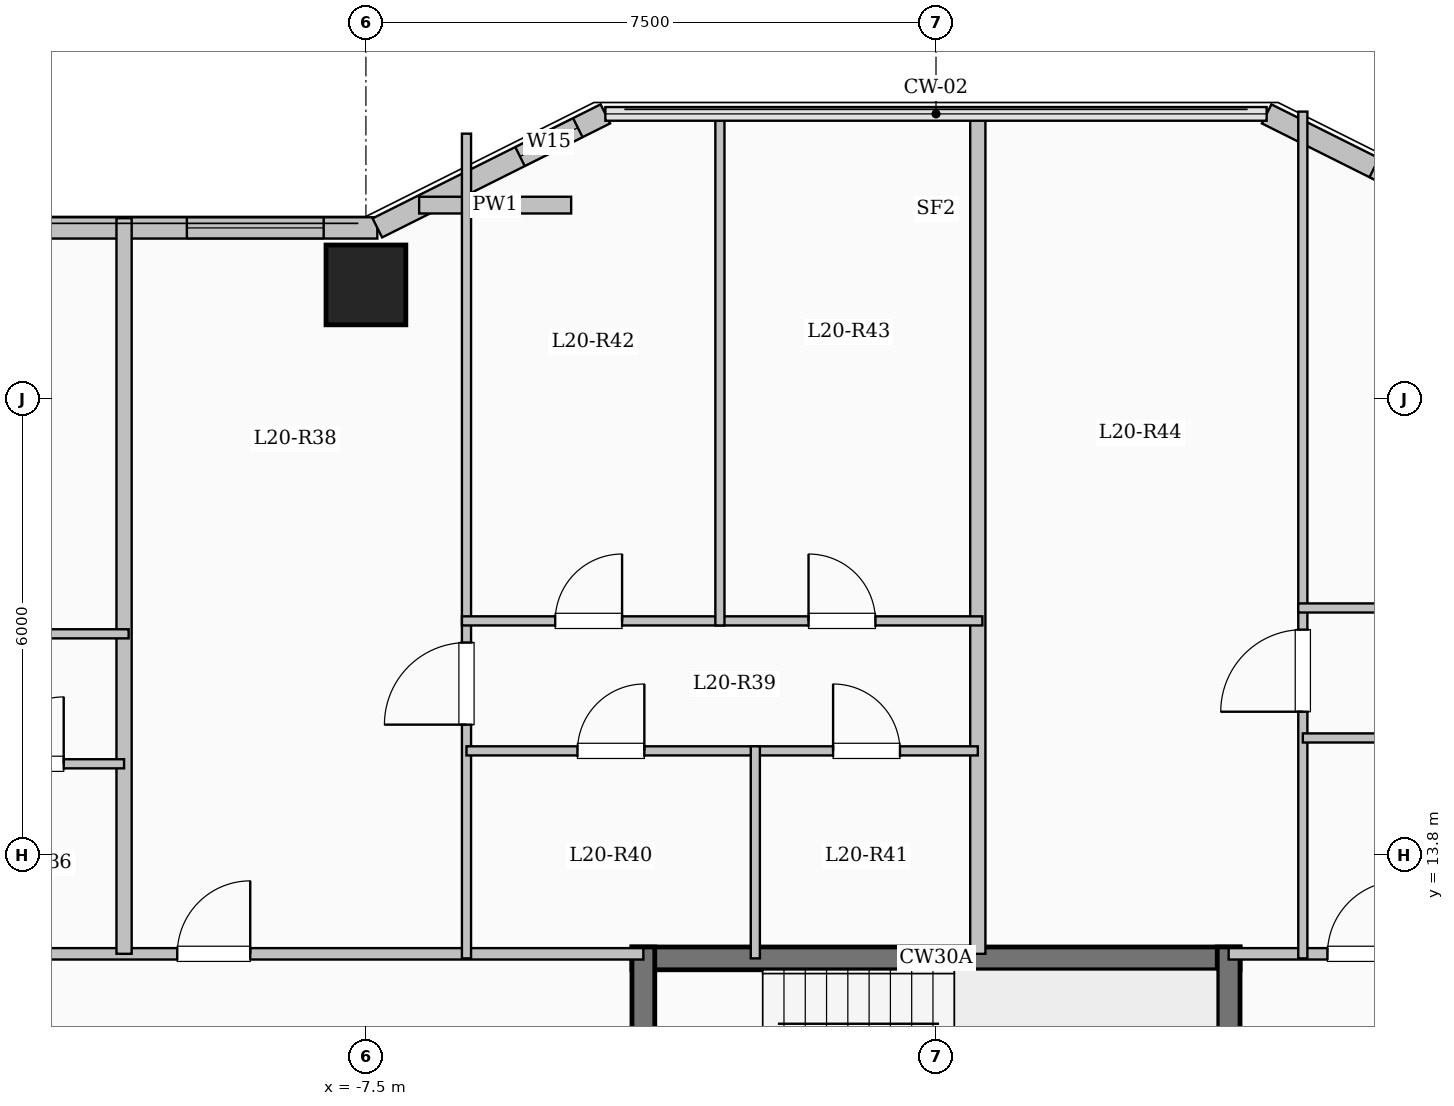
"""IFC4 building model, lengths in metres.
Left out: names, types, materials, properties, quantities, classifications, styles, units other than length and angle.
Written with IfcOpenShell. Run it as: python <this file> out.ifc"""

import sys

from ifc_helpers import new_model, si_unit, direction, frame, frame_2d, origin, origin_2d, place, context, subcontext, project, spatial, rectangle, extrude, element, fill, save


model = new_model("IFC4")
c1 = context("Model", 3, precision=1e-05, world=origin(), true_north=direction((0.0, 1.0)))
c2 = subcontext(c1, "Body", "Model", "MODEL_VIEW")
j1 = project(units=[si_unit("LENGTHUNIT", "METRE"), si_unit("PLANEANGLEUNIT", "RADIAN")], contexts=[c1])
p1 = place(None, origin())
s1 = spatial("IfcSite", under=j1, at=p1, CompositionType="ELEMENT")
p2 = place(p1, origin())
s2 = spatial("IfcBuilding", under=s1, at=p2, CompositionType="ELEMENT")
p3 = place(p2, frame((0.0, 0.0, 78.3)))
s3 = spatial("IfcBuildingStorey", under=s2, at=p3, CompositionType="ELEMENT", Elevation=78.3)
p4 = place(p3, frame((-7.5, 21.3, 0.0), z_axis=(0.0, 0.0, 1.0), x_axis=(1.0, 0.0, 0.0)))
e1 = element("IfcColumn", 1, at=p4, inside=s3, PredefinedType="COLUMN", context=c2, shape_type="SweptSolid", body=[
    extrude(rectangle(XDim=1.05, YDim=1.05, at=origin_2d()), origin(), (0.0, 0.0, 1.0), 3.35),
])
p5 = place(p3, frame((-21.15, 22.05, 0.0), z_axis=(0.0, 0.0, 1.0), x_axis=(1.0, 0.0, 0.0)))
e2 = element("IfcWall", 2, at=p5, inside=s3, PredefinedType="SOLIDWALL", context=c2, shape_type="SweptSolid", body=[
    extrude(rectangle(XDim=13.8, YDim=0.28, at=frame_2d((6.9, 0.0))), origin(), (0.0, 0.0, 1.0), 3.1),
])
p6 = place(p5, frame((1.485, 0.0, 0.9)))
e3 = element("IfcOpeningElement", 3, at=p6, cuts=e2, PredefinedType="OPENING", context=c2, shape_type="SweptSolid", body=[
    extrude(rectangle(XDim=2.4, YDim=1.8, at=frame_2d((1.2, 0.9))), frame((0.0, 0.15, 0.0), z_axis=(0.0, -1.0, 0.0), x_axis=(1.0, 0.0, 0.0)), (0.0, 0.0, 1.0), 0.3),
])
p7 = place(p5, frame((6.979, 0.0, 0.9)))
e4 = element("IfcOpeningElement", 4, at=p7, cuts=e2, PredefinedType="OPENING", context=c2, shape_type="SweptSolid", body=[
    extrude(rectangle(XDim=1.8, YDim=1.65, at=frame_2d((0.9, 0.825))), frame((0.0, 0.15, 0.0), z_axis=(0.0, -1.0, 0.0), x_axis=(1.0, 0.0, 0.0)), (0.0, 0.0, 1.0), 0.3),
])
p8 = place(p5, frame((11.294, 0.0, 0.9)))
e5 = element("IfcOpeningElement", 5, at=p8, cuts=e2, PredefinedType="OPENING", context=c2, shape_type="SweptSolid", body=[
    extrude(rectangle(XDim=1.8, YDim=1.65, at=frame_2d((0.9, 0.825))), frame((0.0, 0.15, 0.0), z_axis=(0.0, -1.0, 0.0), x_axis=(1.0, 0.0, 0.0)), (0.0, 0.0, 1.0), 0.3),
])
p9 = place(p3, frame((-7.35, 22.05, 0.0), z_axis=(0.0, 0.0, 1.0), x_axis=(0.894427191, 0.4472135955, 0.0)))
e6 = element("IfcWall", 6, at=p9, inside=s3, PredefinedType="SOLIDWALL", context=c2, shape_type="SweptSolid", body=[
    extrude(rectangle(XDim=3.354, YDim=0.28, at=frame_2d((1.677, 0.0))), origin(), (0.0, 0.0, 1.0), 3.1),
])
p10 = place(p9, frame((2.099, 0.0, 0.95)))
e7 = element("IfcOpeningElement", 7, at=p10, cuts=e6, PredefinedType="OPENING", context=c2, shape_type="SweptSolid", body=[
    extrude(rectangle(XDim=0.85, YDim=1.5, at=frame_2d((0.425, 0.75))), frame((0.0, 0.15, 0.0), z_axis=(0.0, -1.0, 0.0), x_axis=(1.0, 0.0, 0.0)), (0.0, 0.0, 1.0), 0.3),
])
p11 = place(p3, frame((4.35, 23.55, 0.0), z_axis=(0.0, 0.0, 1.0), x_axis=(0.894427191, -0.4472135955, 0.0)))
e8 = element("IfcWall", 8, at=p11, inside=s3, PredefinedType="SOLIDWALL", context=c2, shape_type="SweptSolid", body=[
    extrude(rectangle(XDim=3.354, YDim=0.28, at=frame_2d((1.677, 0.0))), origin(), (0.0, 0.0, 1.0), 3.1),
])
p12 = place(p11, frame((1.583, 0.0, 0.95)))
e9 = element("IfcOpeningElement", 9, at=p12, cuts=e8, PredefinedType="OPENING", context=c2, shape_type="SweptSolid", body=[
    extrude(rectangle(XDim=1.2, YDim=1.5, at=frame_2d((0.6, 0.75))), frame((0.0, 0.15, 0.0), z_axis=(0.0, -1.0, 0.0), x_axis=(1.0, 0.0, 0.0)), (0.0, 0.0, 1.0), 0.3),
])
p13 = place(p3, frame((-6.8, 22.35, 0.0), z_axis=(0.0, 0.0, 1.0), x_axis=(1.0, 0.0, 0.0)))
e10 = element("IfcWall", 10, at=p13, inside=s3, PredefinedType="PARAPET", context=c2, shape_type="SweptSolid", body=[
    extrude(rectangle(XDim=2.0, YDim=0.22, at=frame_2d((1.0, 0.0))), origin(), (0.0, 0.0, 1.0), 0.85),
])
p14 = place(p3, frame((-4.0, 12.44, 0.0), z_axis=(0.0, 0.0, 1.0), x_axis=(1.0, 0.0, 0.0)))
e11 = element("IfcWall", 11, at=p14, inside=s3, PredefinedType="SHEAR", context=c2, shape_type="SweptSolid", body=[
    extrude(rectangle(XDim=8.0, YDim=0.3, at=frame_2d((4.0, 0.0))), origin(), (0.0, 0.0, 1.0), 3.35),
])
for number, where, z_axis, x_axis in (
    (12, (-3.85, 9.0, 0.0), (0.0, 0.0, 1.0), (0.0, 1.0, 0.0)),
    (13, (3.85, 9.0, 0.0), (0.0, 0.0, 1.0), (0.0, 1.0, 0.0)),
):
    element("IfcWall", number, at=place(p3, frame(where, z_axis=z_axis, x_axis=x_axis)), inside=s3, PredefinedType="SHEAR", context=c2, shape_type="SweptSolid", body=[
        extrude(rectangle(XDim=3.59, YDim=0.3, at=frame_2d((1.795, 0.0))), origin(), (0.0, 0.0, 1.0), 3.35),
    ])
p15 = place(p3, frame((-21.05, 12.5, 0.0), z_axis=(0.0, 0.0, 1.0), x_axis=(1.0, 0.0, 0.0)))
e14 = element("IfcWall", 14, at=p15, inside=s3, PredefinedType="PARTITIONING", context=c2, shape_type="SweptSolid", body=[
    extrude(rectangle(XDim=17.2, YDim=0.15, at=frame_2d((8.6, 0.0))), origin(), (0.0, 0.0, 1.0), 3.1),
])
p16 = place(p15, frame((0.7, 0.0, 0.0)))
e15 = element("IfcOpeningElement", 15, at=p16, cuts=e14, PredefinedType="OPENING", context=c2, shape_type="SweptSolid", body=[
    extrude(rectangle(XDim=0.96, YDim=2.15, at=frame_2d((0.48, 1.075))), frame((0.0, 0.085, 0.0), z_axis=(0.0, -1.0, 0.0), x_axis=(1.0, 0.0, 0.0)), (0.0, 0.0, 1.0), 0.17),
])
p17 = place(p15, frame((11.068, 0.0, 0.0)))
e16 = element("IfcOpeningElement", 16, at=p17, cuts=e14, PredefinedType="OPENING", context=c2, shape_type="SweptSolid", body=[
    extrude(rectangle(XDim=0.96, YDim=2.15, at=frame_2d((0.48, 1.075))), frame((0.0, 0.085, 0.0), z_axis=(0.0, -1.0, 0.0), x_axis=(1.0, 0.0, 0.0)), (0.0, 0.0, 1.0), 0.17),
])
p18 = place(p3, frame((3.85, 12.5, 0.0), z_axis=(0.0, 0.0, 1.0), x_axis=(1.0, 0.0, 0.0)))
e17 = element("IfcWall", 17, at=p18, inside=s3, PredefinedType="PARTITIONING", context=c2, shape_type="SweptSolid", body=[
    extrude(rectangle(XDim=17.2, YDim=0.15, at=frame_2d((8.6, 0.0))), origin(), (0.0, 0.0, 1.0), 3.1),
])
p19 = place(p18, frame((1.3, 0.0, 0.0)))
e18 = element("IfcOpeningElement", 18, at=p19, cuts=e17, PredefinedType="OPENING", context=c2, shape_type="SweptSolid", body=[
    extrude(rectangle(XDim=0.96, YDim=2.15, at=frame_2d((0.48, 1.075))), frame((0.0, 0.085, 0.0), z_axis=(0.0, -1.0, 0.0), x_axis=(1.0, 0.0, 0.0)), (0.0, 0.0, 1.0), 0.17),
])
p20 = place(p18, frame((8.06, 0.0, 0.0)))
e19 = element("IfcOpeningElement", 19, at=p20, cuts=e17, PredefinedType="OPENING", context=c2, shape_type="SweptSolid", body=[
    extrude(rectangle(XDim=0.96, YDim=2.15, at=frame_2d((0.48, 1.075))), frame((0.0, 0.085, 0.0), z_axis=(0.0, -1.0, 0.0), x_axis=(1.0, 0.0, 0.0)), (0.0, 0.0, 1.0), 0.17),
])
p21 = place(p3, frame((0.55, 12.5, 0.0), z_axis=(0.0, 0.0, 1.0), x_axis=(0.0, 1.0, 0.0)))
e20 = element("IfcWall", 20, at=p21, inside=s3, PredefinedType="SOLIDWALL", context=c2, shape_type="SweptSolid", body=[
    extrude(rectangle(XDim=11.08, YDim=0.2, at=frame_2d((5.54, 0.0))), origin(), (0.0, 0.0, 1.0), 3.1),
])
p22 = place(p3, frame((-10.682, 12.5, 0.0), z_axis=(0.0, 0.0, 1.0), x_axis=(0.0, 1.0, 0.0)))
e21 = element("IfcWall", 21, at=p22, inside=s3, PredefinedType="SOLIDWALL", context=c2, shape_type="SweptSolid", body=[
    extrude(rectangle(XDim=9.678, YDim=0.2, at=frame_2d((4.839, 0.0))), origin(), (0.0, 0.0, 1.0), 3.1),
])
p23 = place(p3, frame((-13.15, 15.0, 0.0), z_axis=(0.0, 0.0, 1.0), x_axis=(1.0, 0.0, 0.0)))
e22 = element("IfcWall", 22, at=p23, inside=s3, PredefinedType="PARTITIONING", context=c2, shape_type="SweptSolid", body=[
    extrude(rectangle(XDim=2.468, YDim=0.12, at=frame_2d((1.234, 0.0))), origin(), (0.0, 0.0, 1.0), 3.1),
])
p24 = place(p23, frame((0.794, 0.0, 0.0)))
e23 = element("IfcOpeningElement", 23, at=p24, cuts=e22, PredefinedType="OPENING", context=c2, shape_type="SweptSolid", body=[
    extrude(rectangle(XDim=0.88, YDim=2.1, at=frame_2d((0.44, 1.05))), frame((0.0, 0.07, 0.0), z_axis=(0.0, -1.0, 0.0), x_axis=(1.0, 0.0, 0.0)), (0.0, 0.0, 1.0), 0.14),
])
p25 = place(p3, frame((-15.926, 16.71, 0.0), z_axis=(0.0, 0.0, 1.0), x_axis=(1.0, 0.0, 0.0)))
e24 = element("IfcWall", 24, at=p25, inside=s3, PredefinedType="PARTITIONING", context=c2, shape_type="SweptSolid", body=[
    extrude(rectangle(XDim=5.304, YDim=0.12, at=frame_2d((2.652, 0.0))), origin(), (0.0, 0.0, 1.0), 3.1),
])
p26 = place(p25, frame((2.122, 0.0, 0.0)))
e25 = element("IfcOpeningElement", 25, at=p26, cuts=e24, PredefinedType="OPENING", context=c2, shape_type="SweptSolid", body=[
    extrude(rectangle(XDim=0.88, YDim=2.1, at=frame_2d((0.44, 1.05))), frame((0.0, 0.07, 0.0), z_axis=(0.0, -1.0, 0.0), x_axis=(1.0, 0.0, 0.0)), (0.0, 0.0, 1.0), 0.14),
])
p27 = place(p3, frame((-6.177, 12.44, 0.0), z_axis=(0.0, 0.0, 1.0), x_axis=(0.0, 1.0, 0.0)))
e26 = element("IfcWall", 26, at=p27, inside=s3, PredefinedType="PARTITIONING", context=c2, shape_type="SweptSolid", body=[
    extrude(rectangle(XDim=10.85, YDim=0.12, at=frame_2d((5.425, 0.0))), origin(), (0.0, 0.0, 1.0), 3.1),
])
p28 = place(p27, frame((3.075, 0.0, 0.0)))
e27 = element("IfcOpeningElement", 27, at=p28, cuts=e26, PredefinedType="OPENING", context=c2, shape_type="SweptSolid", body=[
    extrude(rectangle(XDim=1.08, YDim=2.15, at=frame_2d((0.54, 1.075))), frame((0.0, 0.07, 0.0), z_axis=(0.0, -1.0, 0.0), x_axis=(1.0, 0.0, 0.0)), (0.0, 0.0, 1.0), 0.14),
])
p29 = place(p3, frame((-6.177, 15.17, 0.0), z_axis=(0.0, 0.0, 1.0), x_axis=(1.0, 0.0, 0.0)))
e28 = element("IfcWall", 28, at=p29, inside=s3, PredefinedType="PARTITIONING", context=c2, shape_type="SweptSolid", body=[
    extrude(rectangle(XDim=3.8, YDim=0.12, at=frame_2d((1.9, 0.0))), origin(), (0.0, 0.0, 1.0), 3.1),
])
p30 = place(p29, frame((1.46, 0.0, 0.0)))
e29 = element("IfcOpeningElement", 29, at=p30, cuts=e28, PredefinedType="OPENING", context=c2, shape_type="SweptSolid", body=[
    extrude(rectangle(XDim=0.88, YDim=2.1, at=frame_2d((0.44, 1.05))), frame((0.0, 0.07, 0.0), z_axis=(0.0, -1.0, 0.0), x_axis=(1.0, 0.0, 0.0)), (0.0, 0.0, 1.0), 0.14),
])
p31 = place(p3, frame((-2.377, 15.17, 0.0), z_axis=(0.0, 0.0, 1.0), x_axis=(1.0, 0.0, 0.0)))
e30 = element("IfcWall", 30, at=p31, inside=s3, PredefinedType="PARTITIONING", context=c2, shape_type="SweptSolid", body=[
    extrude(rectangle(XDim=2.927, YDim=0.12, at=frame_2d((1.463, 0.0))), origin(), (0.0, 0.0, 1.0), 3.1),
])
p32 = place(p31, frame((1.023, 0.0, 0.0)))
e31 = element("IfcOpeningElement", 31, at=p32, cuts=e30, PredefinedType="OPENING", context=c2, shape_type="SweptSolid", body=[
    extrude(rectangle(XDim=0.88, YDim=2.1, at=frame_2d((0.44, 1.05))), frame((0.0, 0.07, 0.0), z_axis=(0.0, -1.0, 0.0), x_axis=(1.0, 0.0, 0.0)), (0.0, 0.0, 1.0), 0.14),
])
p33 = place(p3, frame((-6.237, 16.88, 0.0), z_axis=(0.0, 0.0, 1.0), x_axis=(1.0, 0.0, 0.0)))
e32 = element("IfcWall", 32, at=p33, inside=s3, PredefinedType="PARTITIONING", context=c2, shape_type="SweptSolid", body=[
    extrude(rectangle(XDim=6.847, YDim=0.12, at=frame_2d((3.424, 0.0))), origin(), (0.0, 0.0, 1.0), 3.1),
])
p34 = place(p33, frame((1.227, 0.0, 0.0)))
e33 = element("IfcOpeningElement", 33, at=p34, cuts=e32, PredefinedType="OPENING", context=c2, shape_type="SweptSolid", body=[
    extrude(rectangle(XDim=0.88, YDim=2.1, at=frame_2d((0.44, 1.05))), frame((0.0, 0.07, 0.0), z_axis=(0.0, -1.0, 0.0), x_axis=(1.0, 0.0, 0.0)), (0.0, 0.0, 1.0), 0.14),
])
p35 = place(p33, frame((4.56, 0.0, 0.0)))
e34 = element("IfcOpeningElement", 34, at=p35, cuts=e32, PredefinedType="OPENING", context=c2, shape_type="SweptSolid", body=[
    extrude(rectangle(XDim=0.88, YDim=2.1, at=frame_2d((0.44, 1.05))), frame((0.0, 0.07, 0.0), z_axis=(0.0, -1.0, 0.0), x_axis=(1.0, 0.0, 0.0)), (0.0, 0.0, 1.0), 0.14),
])
p36 = place(p3, frame((-2.377, 12.44, 0.0), z_axis=(0.0, 0.0, 1.0), x_axis=(0.0, 1.0, 0.0)))
e35 = element("IfcWall", 35, at=p36, inside=s3, PredefinedType="PARTITIONING", context=c2, shape_type="SweptSolid", body=[
    extrude(rectangle(XDim=2.79, YDim=0.12, at=frame_2d((1.395, 0.0))), origin(), (0.0, 0.0, 1.0), 3.1),
])
p37 = place(p3, frame((-2.843, 16.82, 0.0), z_axis=(0.0, 0.0, 1.0), x_axis=(0.0, 1.0, 0.0)))
e36 = element("IfcWall", 36, at=p37, inside=s3, PredefinedType="PARTITIONING", context=c2, shape_type="SweptSolid", body=[
    extrude(rectangle(XDim=6.76, YDim=0.12, at=frame_2d((3.38, 0.0))), origin(), (0.0, 0.0, 1.0), 3.1),
])
p38 = place(p3, frame((4.826, 12.44, 0.0), z_axis=(0.0, 0.0, 1.0), x_axis=(0.0, 1.0, 0.0)))
e37 = element("IfcWall", 37, at=p38, inside=s3, PredefinedType="PARTITIONING", context=c2, shape_type="SweptSolid", body=[
    extrude(rectangle(XDim=11.14, YDim=0.12, at=frame_2d((5.57, 0.0))), origin(), (0.0, 0.0, 1.0), 3.1),
])
p39 = place(p38, frame((3.245, 0.0, 0.0)))
e38 = element("IfcOpeningElement", 38, at=p39, cuts=e37, PredefinedType="OPENING", context=c2, shape_type="SweptSolid", body=[
    extrude(rectangle(XDim=1.08, YDim=2.15, at=frame_2d((0.54, 1.075))), frame((0.0, 0.07, 0.0), z_axis=(0.0, -1.0, 0.0), x_axis=(1.0, 0.0, 0.0)), (0.0, 0.0, 1.0), 0.14),
])
p40 = place(p3, frame((4.826, 15.34, 0.0), z_axis=(0.0, 0.0, 1.0), x_axis=(1.0, 0.0, 0.0)))
e39 = element("IfcWall", 39, at=p40, inside=s3, PredefinedType="PARTITIONING", context=c2, shape_type="SweptSolid", body=[
    extrude(rectangle(XDim=3.099, YDim=0.12, at=frame_2d((1.55, 0.0))), origin(), (0.0, 0.0, 1.0), 3.1),
])
p41 = place(p40, frame((1.11, 0.0, 0.0)))
e40 = element("IfcOpeningElement", 40, at=p41, cuts=e39, PredefinedType="OPENING", context=c2, shape_type="SweptSolid", body=[
    extrude(rectangle(XDim=0.88, YDim=2.1, at=frame_2d((0.44, 1.05))), frame((0.0, 0.07, 0.0), z_axis=(0.0, -1.0, 0.0), x_axis=(1.0, 0.0, 0.0)), (0.0, 0.0, 1.0), 0.14),
])
p42 = place(p3, frame((4.766, 17.05, 0.0), z_axis=(0.0, 0.0, 1.0), x_axis=(1.0, 0.0, 0.0)))
e41 = element("IfcWall", 41, at=p42, inside=s3, PredefinedType="PARTITIONING", context=c2, shape_type="SweptSolid", body=[
    extrude(rectangle(XDim=6.504, YDim=0.12, at=frame_2d((3.252, 0.0))), origin(), (0.0, 0.0, 1.0), 3.1),
])
p43 = place(p42, frame((1.141, 0.0, 0.0)))
e42 = element("IfcOpeningElement", 42, at=p43, cuts=e41, PredefinedType="OPENING", context=c2, shape_type="SweptSolid", body=[
    extrude(rectangle(XDim=0.88, YDim=2.1, at=frame_2d((0.44, 1.05))), frame((0.0, 0.07, 0.0), z_axis=(0.0, -1.0, 0.0), x_axis=(1.0, 0.0, 0.0)), (0.0, 0.0, 1.0), 0.14),
])
p44 = place(p42, frame((4.303, 0.0, 0.0)))
e43 = element("IfcOpeningElement", 43, at=p44, cuts=e41, PredefinedType="OPENING", context=c2, shape_type="SweptSolid", body=[
    extrude(rectangle(XDim=0.88, YDim=2.1, at=frame_2d((0.44, 1.05))), frame((0.0, 0.07, 0.0), z_axis=(0.0, -1.0, 0.0), x_axis=(1.0, 0.0, 0.0)), (0.0, 0.0, 1.0), 0.14),
])
p45 = place(p8, origin())
e44 = element("IfcWindow", 44, at=p45, inside=s3, PartitioningType="SINGLE_PANEL", PredefinedType="WINDOW", context=c2, shape_type="SweptSolid", body=[
    extrude(rectangle(XDim=1.8, YDim=1.65, at=frame_2d((0.9, 0.825))), frame((0.0, 0.03, 0.0), z_axis=(0.0, -1.0, 0.0), x_axis=(1.0, 0.0, 0.0)), (0.0, 0.0, 1.0), 0.06),
])
fill(e5, e44)
p46 = place(p10, origin())
e45 = element("IfcWindow", 45, at=p46, inside=s3, PartitioningType="SINGLE_PANEL", PredefinedType="WINDOW", context=c2, shape_type="SweptSolid", body=[
    extrude(rectangle(XDim=0.85, YDim=1.5, at=frame_2d((0.425, 0.75))), frame((0.0, 0.03, 0.0), z_axis=(0.0, -1.0, 0.0), x_axis=(1.0, 0.0, 0.0)), (0.0, 0.0, 1.0), 0.06),
])
fill(e7, e45)
p47 = place(p12, origin())
e46 = element("IfcWindow", 46, at=p47, inside=s3, PartitioningType="SINGLE_PANEL", PredefinedType="WINDOW", context=c2, shape_type="SweptSolid", body=[
    extrude(rectangle(XDim=1.2, YDim=1.5, at=frame_2d((0.6, 0.75))), frame((0.0, 0.03, 0.0), z_axis=(0.0, -1.0, 0.0), x_axis=(1.0, 0.0, 0.0)), (0.0, 0.0, 1.0), 0.06),
])
fill(e9, e46)
p48 = place(p24, origin())
e47 = element("IfcDoor", 47, at=p48, inside=s3, OperationType="SINGLE_SWING_RIGHT", PredefinedType="DOOR", context=c2, shape_type="SweptSolid", body=[
    extrude(rectangle(XDim=0.88, YDim=2.1, at=frame_2d((0.44, 1.05))), frame((0.0, 0.025, 0.0), z_axis=(0.0, -1.0, 0.0), x_axis=(1.0, 0.0, 0.0)), (0.0, 0.0, 1.0), 0.05),
])
fill(e23, e47)
p49 = place(p17, origin())
e48 = element("IfcDoor", 48, at=p49, inside=s3, OperationType="SINGLE_SWING_RIGHT", PredefinedType="DOOR", context=c2, shape_type="SweptSolid", body=[
    extrude(rectangle(XDim=0.96, YDim=2.15, at=frame_2d((0.48, 1.075))), frame((0.0, 0.025, 0.0), z_axis=(0.0, -1.0, 0.0), x_axis=(1.0, 0.0, 0.0)), (0.0, 0.0, 1.0), 0.05),
])
fill(e16, e48)
p50 = place(p28, origin())
e49 = element("IfcDoor", 49, at=p50, inside=s3, OperationType="SINGLE_SWING_LEFT", PredefinedType="DOOR", context=c2, shape_type="SweptSolid", body=[
    extrude(rectangle(XDim=1.08, YDim=2.15, at=frame_2d((0.54, 1.075))), frame((0.0, 0.025, 0.0), z_axis=(0.0, -1.0, 0.0), x_axis=(1.0, 0.0, 0.0)), (0.0, 0.0, 1.0), 0.05),
])
fill(e27, e49)
p51 = place(p30, origin())
e50 = element("IfcDoor", 50, at=p51, inside=s3, OperationType="SINGLE_SWING_RIGHT", PredefinedType="DOOR", context=c2, shape_type="SweptSolid", body=[
    extrude(rectangle(XDim=0.88, YDim=2.1, at=frame_2d((0.44, 1.05))), frame((0.0, 0.025, 0.0), z_axis=(0.0, -1.0, 0.0), x_axis=(1.0, 0.0, 0.0)), (0.0, 0.0, 1.0), 0.05),
])
fill(e29, e50)
p52 = place(p32, origin())
e51 = element("IfcDoor", 51, at=p52, inside=s3, OperationType="SINGLE_SWING_LEFT", PredefinedType="DOOR", context=c2, shape_type="SweptSolid", body=[
    extrude(rectangle(XDim=0.88, YDim=2.1, at=frame_2d((0.44, 1.05))), frame((0.0, 0.025, 0.0), z_axis=(0.0, -1.0, 0.0), x_axis=(1.0, 0.0, 0.0)), (0.0, 0.0, 1.0), 0.05),
])
fill(e31, e51)
p53 = place(p34, origin())
e52 = element("IfcDoor", 52, at=p53, inside=s3, OperationType="SINGLE_SWING_RIGHT", PredefinedType="DOOR", context=c2, shape_type="SweptSolid", body=[
    extrude(rectangle(XDim=0.88, YDim=2.1, at=frame_2d((0.44, 1.05))), frame((0.0, 0.025, 0.0), z_axis=(0.0, -1.0, 0.0), x_axis=(1.0, 0.0, 0.0)), (0.0, 0.0, 1.0), 0.05),
])
fill(e33, e52)
p54 = place(p35, origin())
e53 = element("IfcDoor", 53, at=p54, inside=s3, OperationType="SINGLE_SWING_LEFT", PredefinedType="DOOR", context=c2, shape_type="SweptSolid", body=[
    extrude(rectangle(XDim=0.88, YDim=2.1, at=frame_2d((0.44, 1.05))), frame((0.0, 0.025, 0.0), z_axis=(0.0, -1.0, 0.0), x_axis=(1.0, 0.0, 0.0)), (0.0, 0.0, 1.0), 0.05),
])
fill(e34, e53)
p55 = place(p19, origin())
e54 = element("IfcDoor", 54, at=p55, inside=s3, OperationType="SINGLE_SWING_RIGHT", PredefinedType="DOOR", context=c2, shape_type="SweptSolid", body=[
    extrude(rectangle(XDim=0.96, YDim=2.15, at=frame_2d((0.48, 1.075))), frame((0.0, 0.025, 0.0), z_axis=(0.0, -1.0, 0.0), x_axis=(1.0, 0.0, 0.0)), (0.0, 0.0, 1.0), 0.05),
])
fill(e18, e54)
p56 = place(p39, origin())
e55 = element("IfcDoor", 55, at=p56, inside=s3, OperationType="SINGLE_SWING_LEFT", PredefinedType="DOOR", context=c2, shape_type="SweptSolid", body=[
    extrude(rectangle(XDim=1.08, YDim=2.15, at=frame_2d((0.54, 1.075))), frame((0.0, 0.025, 0.0), z_axis=(0.0, -1.0, 0.0), x_axis=(1.0, 0.0, 0.0)), (0.0, 0.0, 1.0), 0.05),
])
fill(e38, e55)
save(model, sys.argv[1])
